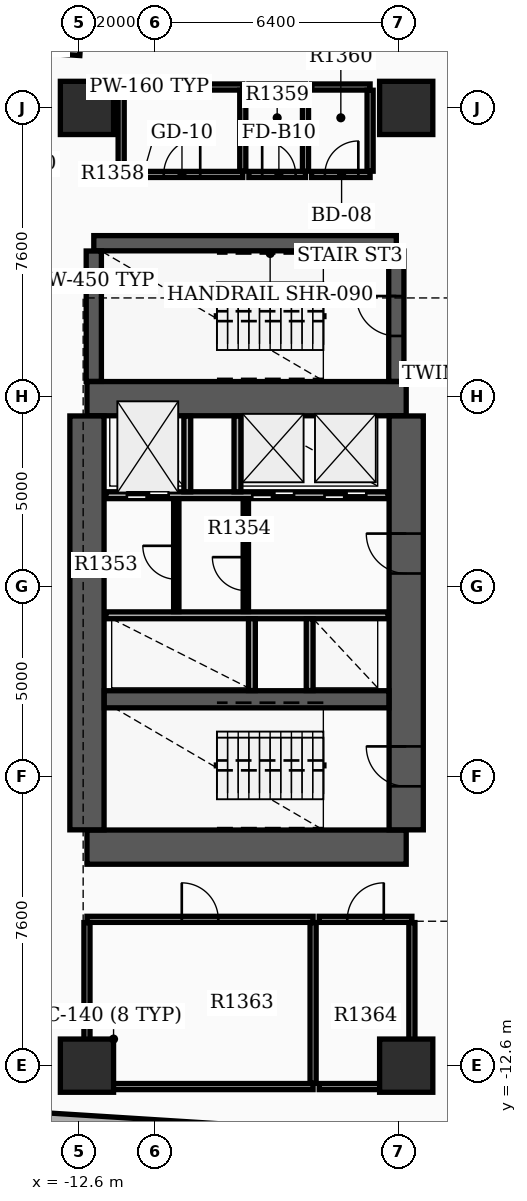
"""IFC4 building model, lengths in metres.
Left out: names, types, materials, properties, quantities, classifications, styles, units other than length and angle.
Written with IfcOpenShell. Run it as: python <this file> out.ifc"""

import sys

from ifc_helpers import new_model, si_unit, direction, frame, frame_2d, origin, origin_2d, place, context, subcontext, project, spatial, rectangle, extrude, element, fill, save


model = new_model("IFC4")
c1 = context("Model", 3, precision=1e-05, world=origin(), true_north=direction((0.0, 1.0)))
c2 = subcontext(c1, "Body", "Model", "MODEL_VIEW")
j1 = project(units=[si_unit("LENGTHUNIT", "METRE"), si_unit("PLANEANGLEUNIT", "RADIAN")], contexts=[c1])
p1 = place(None, origin())
s1 = spatial("IfcSite", under=j1, at=p1, CompositionType="ELEMENT")
p2 = place(p1, origin())
s2 = spatial("IfcBuilding", under=s1, at=p2, CompositionType="ELEMENT")
p3 = place(p2, frame((0.0, 0.0, 87.3)))
s3 = spatial("IfcBuildingStorey", under=s2, at=p3, CompositionType="ELEMENT", Elevation=87.3)
for number, where, z_axis, x_axis in (
    (1, (-12.4, -6.85, 0.0), (0.0, 0.0, 1.0), (1.0, 0.0, 0.0)),
    (2, (-12.4, 4.95, 0.0), (0.0, 0.0, 1.0), (1.0, 0.0, 0.0)),
):
    element("IfcWall", number, at=place(p3, frame(where, z_axis=z_axis, x_axis=x_axis)), inside=s3, PredefinedType="SHEAR", context=c2, shape_type="SweptSolid", body=[
        extrude(rectangle(XDim=8.4, YDim=0.9, at=frame_2d((4.2, 0.0))), origin(), (0.0, 0.0, 1.0), 3.7),
    ])
p4 = place(p3, frame((-12.4, -6.395, 0.0), z_axis=(0.0, 0.0, 1.0), x_axis=(0.0, 1.0, 0.0)))
e3 = element("IfcWall", 3, at=p4, inside=s3, PredefinedType="SHEAR", context=c2, shape_type="SweptSolid", body=[
    extrude(rectangle(XDim=10.89, YDim=0.9, at=frame_2d((5.445, 0.0))), origin(), (0.0, 0.0, 1.0), 3.7),
])
p5 = place(p3, frame((-4.0, -6.395, 0.0), z_axis=(0.0, 0.0, 1.0), x_axis=(0.0, 1.0, 0.0)))
e4 = element("IfcWall", 4, at=p5, inside=s3, PredefinedType="SHEAR", context=c2, shape_type="SweptSolid", body=[
    extrude(rectangle(XDim=10.89, YDim=0.9, at=frame_2d((5.445, 0.0))), origin(), (0.0, 0.0, 1.0), 3.7),
])
p6 = place(p5, frame((1.145, 0.0, 0.0)))
e5 = element("IfcOpeningElement", 5, at=p6, cuts=e4, PredefinedType="OPENING", context=c2, shape_type="SweptSolid", body=[
    extrude(rectangle(XDim=1.05, YDim=2.15, at=frame_2d((0.525, 1.075))), frame((0.0, 0.46, 0.0), z_axis=(0.0, -1.0, 0.0), x_axis=(1.0, 0.0, 0.0)), (0.0, 0.0, 1.0), 0.92),
])
p7 = place(p5, frame((6.745, 0.0, 0.0)))
e6 = element("IfcOpeningElement", 6, at=p7, cuts=e4, PredefinedType="OPENING", context=c2, shape_type="SweptSolid", body=[
    extrude(rectangle(XDim=1.05, YDim=2.15, at=frame_2d((0.525, 1.075))), frame((0.0, 0.46, 0.0), z_axis=(0.0, -1.0, 0.0), x_axis=(1.0, 0.0, 0.0)), (0.0, 0.0, 1.0), 0.92),
])
p8 = place(p3, frame((-11.945, -2.96, 0.0), z_axis=(0.0, 0.0, 1.0), x_axis=(1.0, 0.0, 0.0)))
e7 = element("IfcWall", 7, at=p8, inside=s3, PredefinedType="SHEAR", context=c2, shape_type="SweptSolid", body=[
    extrude(rectangle(XDim=7.49, YDim=0.45, at=frame_2d((3.745, 0.0))), origin(), (0.0, 0.0, 1.0), 3.7),
])
p9 = place(p3, frame((-12.22, 9.04, 0.0), z_axis=(0.0, 0.0, 1.0), x_axis=(1.0, 0.0, 0.0)))
e8 = element("IfcWall", 8, at=p9, inside=s3, PredefinedType="SHEAR", context=c2, shape_type="SweptSolid", body=[
    extrude(rectangle(XDim=7.96, YDim=0.4, at=frame_2d((3.98, 0.0))), origin(), (0.0, 0.0, 1.0), 3.7),
])
p10 = place(p3, frame((-12.22, 5.405, 0.0), z_axis=(0.0, 0.0, 1.0), x_axis=(0.0, 1.0, 0.0)))
e9 = element("IfcWall", 9, at=p10, inside=s3, PredefinedType="SHEAR", context=c2, shape_type="SweptSolid", body=[
    extrude(rectangle(XDim=3.43, YDim=0.4, at=frame_2d((1.715, 0.0))), origin(), (0.0, 0.0, 1.0), 3.7),
])
p11 = place(p3, frame((-4.26, 5.405, 0.0), z_axis=(0.0, 0.0, 1.0), x_axis=(0.0, 1.0, 0.0)))
e10 = element("IfcWall", 10, at=p11, inside=s3, PredefinedType="SHEAR", context=c2, shape_type="SweptSolid", body=[
    extrude(rectangle(XDim=3.43, YDim=0.4, at=frame_2d((1.715, 0.0))), origin(), (0.0, 0.0, 1.0), 3.7),
])
p12 = place(p11, frame((1.195, 0.0, 0.0)))
e11 = element("IfcOpeningElement", 11, at=p12, cuts=e10, PredefinedType="OPENING", context=c2, shape_type="SweptSolid", body=[
    extrude(rectangle(XDim=1.05, YDim=2.15, at=frame_2d((0.525, 1.075))), frame((0.0, 0.21, 0.0), z_axis=(0.0, -1.0, 0.0), x_axis=(1.0, 0.0, 0.0)), (0.0, 0.0, 1.0), 0.42),
])
for number, where, z_axis, x_axis in (
    (12, (-12.4, -12.6, 0.0), (0.0, 0.0, 1.0), (1.0, 0.0, 0.0)),
    (13, (-12.4, 12.6, 0.0), (0.0, 0.0, 1.0), (1.0, 0.0, 0.0)),
    (14, (-4.0, -12.6, 0.0), (0.0, 0.0, 1.0), (1.0, 0.0, 0.0)),
    (15, (-4.0, 12.6, 0.0), (0.0, 0.0, 1.0), (1.0, 0.0, 0.0)),
):
    element("IfcColumn", number, at=place(p3, frame(where, z_axis=z_axis, x_axis=x_axis)), inside=s3, PredefinedType="COLUMN", context=c2, shape_type="SweptSolid", body=[
        extrude(rectangle(XDim=1.4, YDim=1.4, at=origin_2d()), origin(), (0.0, 0.0, 1.0), 3.9),
    ])
p13 = place(p3, frame((-13.796, 14.194, 0.0), z_axis=(0.0, 0.0, 1.0), x_axis=(0.998023660242, -0.06283926796, 0.0)))
e16 = element("IfcWall", 16, at=p13, inside=s3, PredefinedType="STANDARD", context=c2, shape_type="SweptSolid", body=[
    extrude(rectangle(XDim=1.22, YDim=0.28, at=frame_2d((0.61, 0.0))), origin(), (0.0, 0.0, 1.0), 2.91),
])
p14 = place(p3, frame((-14.063, -13.945, 0.0), z_axis=(0.0, 0.0, 1.0), x_axis=(0.998027314704, -0.062781200242, 0.0)))
e17 = element("IfcWall", 17, at=p14, inside=s3, PredefinedType="STANDARD", context=c2, shape_type="SweptSolid", body=[
    extrude(rectangle(XDim=6.3, YDim=0.28, at=frame_2d((3.15, 0.0))), origin(), (0.0, 0.0, 1.0), 2.91),
])
p15 = place(p3, frame((-11.9, 2.41, 0.0), z_axis=(0.0, 0.0, 1.0), x_axis=(1.0, 0.0, 0.0)))
e18 = element("IfcWall", 18, at=p15, inside=s3, PredefinedType="SOLIDWALL", context=c2, shape_type="SweptSolid", body=[
    extrude(rectangle(XDim=7.42, YDim=0.18, at=frame_2d((3.71, 0.0))), origin(), (0.0, 0.0, 1.0), 2.9),
])
p16 = place(p15, frame((0.55, 0.0, 0.0)))
e19 = element("IfcOpeningElement", 19, at=p16, cuts=e18, PredefinedType="OPENING", context=c2, shape_type="SweptSolid", body=[
    extrude(rectangle(XDim=1.1, YDim=2.15, at=frame_2d((0.55, 1.075))), frame((0.0, 0.1, 0.0), z_axis=(0.0, -1.0, 0.0), x_axis=(1.0, 0.0, 0.0)), (0.0, 0.0, 1.0), 0.2),
])
p17 = place(p15, frame((3.85, 0.0, 0.0)))
e20 = element("IfcOpeningElement", 20, at=p17, cuts=e18, PredefinedType="OPENING", context=c2, shape_type="SweptSolid", body=[
    extrude(rectangle(XDim=1.1, YDim=2.15, at=frame_2d((0.55, 1.075))), frame((0.0, 0.1, 0.0), z_axis=(0.0, -1.0, 0.0), x_axis=(1.0, 0.0, 0.0)), (0.0, 0.0, 1.0), 0.2),
])
p18 = place(p15, frame((5.75, 0.0, 0.0)))
e21 = element("IfcOpeningElement", 21, at=p18, cuts=e18, PredefinedType="OPENING", context=c2, shape_type="SweptSolid", body=[
    extrude(rectangle(XDim=1.1, YDim=2.15, at=frame_2d((0.55, 1.075))), frame((0.0, 0.1, 0.0), z_axis=(0.0, -1.0, 0.0), x_axis=(1.0, 0.0, 0.0)), (0.0, 0.0, 1.0), 0.2),
])
p19 = place(p3, frame((-11.9, -0.75, 0.0), z_axis=(0.0, 0.0, 1.0), x_axis=(1.0, 0.0, 0.0)))
e22 = element("IfcWall", 22, at=p19, inside=s3, PredefinedType="SOLIDWALL", context=c2, shape_type="SweptSolid", body=[
    extrude(rectangle(XDim=7.42, YDim=0.18, at=frame_2d((3.71, 0.0))), origin(), (0.0, 0.0, 1.0), 2.9),
])
for number, where, z_axis, x_axis in (
    (23, (-9.76, 2.5, 0.0), (0.0, 0.0, 1.0), (0.0, 1.0, 0.0)),
    (24, (-8.44, 2.5, 0.0), (0.0, 0.0, 1.0), (0.0, 1.0, 0.0)),
):
    element("IfcWall", number, at=place(p3, frame(where, z_axis=z_axis, x_axis=x_axis)), inside=s3, PredefinedType="SOLIDWALL", context=c2, shape_type="SweptSolid", body=[
        extrude(rectangle(XDim=1.99, YDim=0.18, at=frame_2d((0.995, 0.0))), origin(), (0.0, 0.0, 1.0), 2.9),
    ])
for number, where, z_axis, x_axis in (
    (25, (-8.06, -2.73, 0.0), (0.0, 0.0, 1.0), (0.0, 1.0, 0.0)),
    (26, (-6.54, -2.73, 0.0), (0.0, 0.0, 1.0), (0.0, 1.0, 0.0)),
):
    element("IfcWall", number, at=place(p3, frame(where, z_axis=z_axis, x_axis=x_axis)), inside=s3, PredefinedType="SOLIDWALL", context=c2, shape_type="SweptSolid", body=[
        extrude(rectangle(XDim=1.89, YDim=0.18, at=frame_2d((0.945, 0.0))), origin(), (0.0, 0.0, 1.0), 2.9),
    ])
p20 = place(p3, frame((-8.22, -0.65, 0.0), z_axis=(0.0, 0.0, 1.0), x_axis=(0.0, 1.0, 0.0)))
e27 = element("IfcWall", 27, at=p20, inside=s3, PredefinedType="SOLIDWALL", context=c2, shape_type="SweptSolid", body=[
    extrude(rectangle(XDim=2.96, YDim=0.14, at=frame_2d((1.48, 0.0))), origin(), (0.0, 0.0, 1.0), 2.9),
])
p21 = place(p20, frame((0.55, 0.0, 0.0)))
e28 = element("IfcOpeningElement", 28, at=p21, cuts=e27, PredefinedType="OPENING", context=c2, shape_type="SweptSolid", body=[
    extrude(rectangle(XDim=0.88, YDim=2.1, at=frame_2d((0.44, 1.05))), frame((0.0, 0.08, 0.0), z_axis=(0.0, -1.0, 0.0), x_axis=(1.0, 0.0, 0.0)), (0.0, 0.0, 1.0), 0.16),
])
p22 = place(p3, frame((-10.05, -0.652, 0.0), z_axis=(0.0, 0.0, 1.0), x_axis=(0.0, 1.0, 0.0)))
e29 = element("IfcWall", 29, at=p22, inside=s3, PredefinedType="PARTITIONING", context=c2, shape_type="SweptSolid", body=[
    extrude(rectangle(XDim=2.962, YDim=0.14, at=frame_2d((1.481, 0.0))), origin(), (0.0, 0.0, 1.0), 2.9),
])
p23 = place(p22, frame((0.85, 0.0, 0.0)))
e30 = element("IfcOpeningElement", 30, at=p23, cuts=e29, PredefinedType="OPENING", context=c2, shape_type="SweptSolid", body=[
    extrude(rectangle(XDim=0.88, YDim=2.1, at=frame_2d((0.44, 1.05))), frame((0.0, 0.08, 0.0), z_axis=(0.0, -1.0, 0.0), x_axis=(1.0, 0.0, 0.0)), (0.0, 0.0, 1.0), 0.16),
])
p24 = place(p3, frame((-11.5, 10.85, 0.0), z_axis=(0.0, 0.0, 1.0), x_axis=(1.0, 0.0, 0.0)))
e31 = element("IfcWall", 31, at=p24, inside=s3, PredefinedType="PARTITIONING", context=c2, shape_type="SweptSolid", body=[
    extrude(rectangle(XDim=3.2, YDim=0.16, at=frame_2d((1.6, 0.0))), origin(), (0.0, 0.0, 1.0), 2.9),
])
p25 = place(p24, frame((1.12, 0.0, 0.0)))
e32 = element("IfcOpeningElement", 32, at=p25, cuts=e31, PredefinedType="OPENING", context=c2, shape_type="SweptSolid", body=[
    extrude(rectangle(XDim=0.96, YDim=2.15, at=frame_2d((0.48, 1.075))), frame((0.0, 0.09, 0.0), z_axis=(0.0, -1.0, 0.0), x_axis=(1.0, 0.0, 0.0)), (0.0, 0.0, 1.0), 0.18),
])
p26 = place(p3, frame((-11.5, 13.15, 0.0), z_axis=(0.0, 0.0, 1.0), x_axis=(1.0, 0.0, 0.0)))
e33 = element("IfcWall", 33, at=p26, inside=s3, PredefinedType="PARTITIONING", context=c2, shape_type="SweptSolid", body=[
    extrude(rectangle(XDim=3.2, YDim=0.16, at=frame_2d((1.6, 0.0))), origin(), (0.0, 0.0, 1.0), 2.9),
])
for number, where, z_axis, x_axis in (
    (34, (-11.5, 10.935, 0.0), (0.0, 0.0, 1.0), (0.0, 1.0, 0.0)),
    (35, (-8.3, 10.935, 0.0), (0.0, 0.0, 1.0), (0.0, 1.0, 0.0)),
):
    element("IfcWall", number, at=place(p3, frame(where, z_axis=z_axis, x_axis=x_axis)), inside=s3, PredefinedType="PARTITIONING", context=c2, shape_type="SweptSolid", body=[
        extrude(rectangle(XDim=2.13, YDim=0.16, at=frame_2d((1.065, 0.0))), origin(), (0.0, 0.0, 1.0), 2.9),
    ])
p27 = place(p3, frame((-8.14, 10.85, 0.0), z_axis=(0.0, 0.0, 1.0), x_axis=(1.0, 0.0, 0.0)))
e36 = element("IfcWall", 36, at=p27, inside=s3, PredefinedType="PARTITIONING", context=c2, shape_type="SweptSolid", body=[
    extrude(rectangle(XDim=1.49, YDim=0.16, at=frame_2d((0.745, 0.0))), origin(), (0.0, 0.0, 1.0), 2.9),
])
p28 = place(p27, frame((0.35, 0.0, 0.0)))
e37 = element("IfcOpeningElement", 37, at=p28, cuts=e36, PredefinedType="OPENING", context=c2, shape_type="SweptSolid", body=[
    extrude(rectangle(XDim=0.88, YDim=2.1, at=frame_2d((0.44, 1.05))), frame((0.0, 0.09, 0.0), z_axis=(0.0, -1.0, 0.0), x_axis=(1.0, 0.0, 0.0)), (0.0, 0.0, 1.0), 0.18),
])
p29 = place(p3, frame((-8.14, 13.15, 0.0), z_axis=(0.0, 0.0, 1.0), x_axis=(1.0, 0.0, 0.0)))
e38 = element("IfcWall", 38, at=p29, inside=s3, PredefinedType="PARTITIONING", context=c2, shape_type="SweptSolid", body=[
    extrude(rectangle(XDim=1.49, YDim=0.16, at=frame_2d((0.745, 0.0))), origin(), (0.0, 0.0, 1.0), 2.9),
])
p30 = place(p3, frame((-6.65, 10.935, 0.0), z_axis=(0.0, 0.0, 1.0), x_axis=(0.0, 1.0, 0.0)))
e39 = element("IfcWall", 39, at=p30, inside=s3, PredefinedType="PARTITIONING", context=c2, shape_type="SweptSolid", body=[
    extrude(rectangle(XDim=2.13, YDim=0.16, at=frame_2d((1.065, 0.0))), origin(), (0.0, 0.0, 1.0), 2.9),
])
p31 = place(p3, frame((-6.49, 10.85, 0.0), z_axis=(0.0, 0.0, 1.0), x_axis=(1.0, 0.0, 0.0)))
e40 = element("IfcWall", 40, at=p31, inside=s3, PredefinedType="PARTITIONING", context=c2, shape_type="SweptSolid", body=[
    extrude(rectangle(XDim=1.54, YDim=0.16, at=frame_2d((0.77, 0.0))), origin(), (0.0, 0.0, 1.0), 2.9),
])
p32 = place(p31, frame((0.35, 0.0, 0.0)))
e41 = element("IfcOpeningElement", 41, at=p32, cuts=e40, PredefinedType="OPENING", context=c2, shape_type="SweptSolid", body=[
    extrude(rectangle(XDim=0.88, YDim=2.15, at=frame_2d((0.44, 1.075))), frame((0.0, 0.09, 0.0), z_axis=(0.0, -1.0, 0.0), x_axis=(1.0, 0.0, 0.0)), (0.0, 0.0, 1.0), 0.18),
])
p33 = place(p3, frame((-6.49, 13.15, 0.0), z_axis=(0.0, 0.0, 1.0), x_axis=(1.0, 0.0, 0.0)))
e42 = element("IfcWall", 42, at=p33, inside=s3, PredefinedType="PARTITIONING", context=c2, shape_type="SweptSolid", body=[
    extrude(rectangle(XDim=1.54, YDim=0.16, at=frame_2d((0.77, 0.0))), origin(), (0.0, 0.0, 1.0), 2.9),
])
p34 = place(p3, frame((-4.95, 10.935, 0.0), z_axis=(0.0, 0.0, 1.0), x_axis=(0.0, 1.0, 0.0)))
e43 = element("IfcWall", 43, at=p34, inside=s3, PredefinedType="PARTITIONING", context=c2, shape_type="SweptSolid", body=[
    extrude(rectangle(XDim=2.13, YDim=0.16, at=frame_2d((1.065, 0.0))), origin(), (0.0, 0.0, 1.0), 2.9),
])
p35 = place(p3, frame((-12.4, -13.15, 0.0), z_axis=(0.0, 0.0, 1.0), x_axis=(1.0, 0.0, 0.0)))
e44 = element("IfcWall", 44, at=p35, inside=s3, PredefinedType="PARTITIONING", context=c2, shape_type="SweptSolid", body=[
    extrude(rectangle(XDim=5.95, YDim=0.16, at=frame_2d((2.975, 0.0))), origin(), (0.0, 0.0, 1.0), 2.9),
])
p36 = place(p3, frame((-12.4, -8.75, 0.0), z_axis=(0.0, 0.0, 1.0), x_axis=(1.0, 0.0, 0.0)))
e45 = element("IfcWall", 45, at=p36, inside=s3, PredefinedType="PARTITIONING", context=c2, shape_type="SweptSolid", body=[
    extrude(rectangle(XDim=5.95, YDim=0.16, at=frame_2d((2.975, 0.0))), origin(), (0.0, 0.0, 1.0), 2.9),
])
p37 = place(p36, frame((2.495, 0.0, 0.0)))
e46 = element("IfcOpeningElement", 46, at=p37, cuts=e45, PredefinedType="OPENING", context=c2, shape_type="SweptSolid", body=[
    extrude(rectangle(XDim=0.96, YDim=2.15, at=frame_2d((0.48, 1.075))), frame((0.0, 0.09, 0.0), z_axis=(0.0, -1.0, 0.0), x_axis=(1.0, 0.0, 0.0)), (0.0, 0.0, 1.0), 0.18),
])
for number, where, z_axis, x_axis in (
    (47, (-12.4, -13.065, 0.0), (0.0, 0.0, 1.0), (0.0, 1.0, 0.0)),
    (48, (-6.45, -13.065, 0.0), (0.0, 0.0, 1.0), (0.0, 1.0, 0.0)),
):
    element("IfcWall", number, at=place(p3, frame(where, z_axis=z_axis, x_axis=x_axis)), inside=s3, PredefinedType="PARTITIONING", context=c2, shape_type="SweptSolid", body=[
        extrude(rectangle(XDim=4.23, YDim=0.16, at=frame_2d((2.115, 0.0))), origin(), (0.0, 0.0, 1.0), 2.9),
    ])
p38 = place(p3, frame((-6.29, -13.15, 0.0), z_axis=(0.0, 0.0, 1.0), x_axis=(1.0, 0.0, 0.0)))
e49 = element("IfcWall", 49, at=p38, inside=s3, PredefinedType="PARTITIONING", context=c2, shape_type="SweptSolid", body=[
    extrude(rectangle(XDim=2.44, YDim=0.16, at=frame_2d((1.22, 0.0))), origin(), (0.0, 0.0, 1.0), 2.9),
])
p39 = place(p3, frame((-6.29, -8.75, 0.0), z_axis=(0.0, 0.0, 1.0), x_axis=(1.0, 0.0, 0.0)))
e50 = element("IfcWall", 50, at=p39, inside=s3, PredefinedType="PARTITIONING", context=c2, shape_type="SweptSolid", body=[
    extrude(rectangle(XDim=2.44, YDim=0.16, at=frame_2d((1.22, 0.0))), origin(), (0.0, 0.0, 1.0), 2.9),
])
p40 = place(p39, frame((0.74, 0.0, 0.0)))
e51 = element("IfcOpeningElement", 51, at=p40, cuts=e50, PredefinedType="OPENING", context=c2, shape_type="SweptSolid", body=[
    extrude(rectangle(XDim=0.96, YDim=2.15, at=frame_2d((0.48, 1.075))), frame((0.0, 0.09, 0.0), z_axis=(0.0, -1.0, 0.0), x_axis=(1.0, 0.0, 0.0)), (0.0, 0.0, 1.0), 0.18),
])
p41 = place(p3, frame((-3.85, -13.065, 0.0), z_axis=(0.0, 0.0, 1.0), x_axis=(0.0, 1.0, 0.0)))
e52 = element("IfcWall", 52, at=p41, inside=s3, PredefinedType="PARTITIONING", context=c2, shape_type="SweptSolid", body=[
    extrude(rectangle(XDim=4.23, YDim=0.16, at=frame_2d((2.115, 0.0))), origin(), (0.0, 0.0, 1.0), 2.9),
])
p42 = place(p6, origin())
e53 = element("IfcDoor", 53, at=p42, inside=s3, OperationType="SINGLE_SWING_RIGHT", PredefinedType="DOOR", context=c2, shape_type="SweptSolid", body=[
    extrude(rectangle(XDim=1.05, YDim=2.15, at=frame_2d((0.525, 1.075))), frame((0.0, 0.025, 0.0), z_axis=(0.0, -1.0, 0.0), x_axis=(1.0, 0.0, 0.0)), (0.0, 0.0, 1.0), 0.05),
])
fill(e5, e53)
p43 = place(p7, origin())
e54 = element("IfcDoor", 54, at=p43, inside=s3, OperationType="SINGLE_SWING_RIGHT", PredefinedType="DOOR", context=c2, shape_type="SweptSolid", body=[
    extrude(rectangle(XDim=1.05, YDim=2.15, at=frame_2d((0.525, 1.075))), frame((0.0, 0.025, 0.0), z_axis=(0.0, -1.0, 0.0), x_axis=(1.0, 0.0, 0.0)), (0.0, 0.0, 1.0), 0.05),
])
fill(e6, e54)
p44 = place(p12, origin())
e55 = element("IfcDoor", 55, at=p44, inside=s3, OperationType="SINGLE_SWING_RIGHT", PredefinedType="DOOR", context=c2, shape_type="SweptSolid", body=[
    extrude(rectangle(XDim=1.05, YDim=2.15, at=frame_2d((0.525, 1.075))), frame((0.0, 0.025, 0.0), z_axis=(0.0, -1.0, 0.0), x_axis=(1.0, 0.0, 0.0)), (0.0, 0.0, 1.0), 0.05),
])
fill(e11, e55)
p45 = place(p16, origin())
e56 = element("IfcDoor", 56, at=p45, inside=s3, OperationType="DOUBLE_DOOR_SLIDING", PredefinedType="DOOR", context=c2, shape_type="SweptSolid", body=[
    extrude(rectangle(XDim=1.1, YDim=2.15, at=frame_2d((0.55, 1.075))), frame((0.0, 0.025, 0.0), z_axis=(0.0, -1.0, 0.0), x_axis=(1.0, 0.0, 0.0)), (0.0, 0.0, 1.0), 0.05),
])
fill(e19, e56)
p46 = place(p17, origin())
e57 = element("IfcDoor", 57, at=p46, inside=s3, OperationType="DOUBLE_DOOR_SLIDING", PredefinedType="DOOR", context=c2, shape_type="SweptSolid", body=[
    extrude(rectangle(XDim=1.1, YDim=2.15, at=frame_2d((0.55, 1.075))), frame((0.0, 0.025, 0.0), z_axis=(0.0, -1.0, 0.0), x_axis=(1.0, 0.0, 0.0)), (0.0, 0.0, 1.0), 0.05),
])
fill(e20, e57)
p47 = place(p18, origin())
e58 = element("IfcDoor", 58, at=p47, inside=s3, OperationType="DOUBLE_DOOR_SLIDING", PredefinedType="DOOR", context=c2, shape_type="SweptSolid", body=[
    extrude(rectangle(XDim=1.1, YDim=2.15, at=frame_2d((0.55, 1.075))), frame((0.0, 0.025, 0.0), z_axis=(0.0, -1.0, 0.0), x_axis=(1.0, 0.0, 0.0)), (0.0, 0.0, 1.0), 0.05),
])
fill(e21, e58)
p48 = place(p21, origin())
e59 = element("IfcDoor", 59, at=p48, inside=s3, OperationType="SINGLE_SWING_RIGHT", PredefinedType="DOOR", context=c2, shape_type="SweptSolid", body=[
    extrude(rectangle(XDim=0.88, YDim=2.1, at=frame_2d((0.44, 1.05))), frame((0.0, 0.025, 0.0), z_axis=(0.0, -1.0, 0.0), x_axis=(1.0, 0.0, 0.0)), (0.0, 0.0, 1.0), 0.05),
])
fill(e28, e59)
p49 = place(p23, origin())
e60 = element("IfcDoor", 60, at=p49, inside=s3, OperationType="SINGLE_SWING_RIGHT", PredefinedType="DOOR", context=c2, shape_type="SweptSolid", body=[
    extrude(rectangle(XDim=0.88, YDim=2.1, at=frame_2d((0.44, 1.05))), frame((0.0, 0.025, 0.0), z_axis=(0.0, -1.0, 0.0), x_axis=(1.0, 0.0, 0.0)), (0.0, 0.0, 1.0), 0.05),
])
fill(e30, e60)
p50 = place(p25, origin())
e61 = element("IfcDoor", 61, at=p50, inside=s3, OperationType="SINGLE_SWING_RIGHT", PredefinedType="DOOR", context=c2, shape_type="SweptSolid", body=[
    extrude(rectangle(XDim=0.96, YDim=2.15, at=frame_2d((0.48, 1.075))), frame((0.0, 0.025, 0.0), z_axis=(0.0, -1.0, 0.0), x_axis=(1.0, 0.0, 0.0)), (0.0, 0.0, 1.0), 0.05),
])
fill(e32, e61)
p51 = place(p28, origin())
e62 = element("IfcDoor", 62, at=p51, inside=s3, OperationType="SINGLE_SWING_LEFT", PredefinedType="DOOR", context=c2, shape_type="SweptSolid", body=[
    extrude(rectangle(XDim=0.88, YDim=2.1, at=frame_2d((0.44, 1.05))), frame((0.0, 0.025, 0.0), z_axis=(0.0, -1.0, 0.0), x_axis=(1.0, 0.0, 0.0)), (0.0, 0.0, 1.0), 0.05),
])
fill(e37, e62)
p52 = place(p32, origin())
e63 = element("IfcDoor", 63, at=p52, inside=s3, OperationType="SINGLE_SWING_RIGHT", PredefinedType="DOOR", context=c2, shape_type="SweptSolid", body=[
    extrude(rectangle(XDim=0.88, YDim=2.15, at=frame_2d((0.44, 1.075))), frame((0.0, 0.025, 0.0), z_axis=(0.0, -1.0, 0.0), x_axis=(1.0, 0.0, 0.0)), (0.0, 0.0, 1.0), 0.05),
])
fill(e41, e63)
p53 = place(p37, origin())
e64 = element("IfcDoor", 64, at=p53, inside=s3, OperationType="SINGLE_SWING_LEFT", PredefinedType="DOOR", context=c2, shape_type="SweptSolid", body=[
    extrude(rectangle(XDim=0.96, YDim=2.15, at=frame_2d((0.48, 1.075))), frame((0.0, 0.025, 0.0), z_axis=(0.0, -1.0, 0.0), x_axis=(1.0, 0.0, 0.0)), (0.0, 0.0, 1.0), 0.05),
])
fill(e46, e64)
p54 = place(p40, origin())
e65 = element("IfcDoor", 65, at=p54, inside=s3, OperationType="SINGLE_SWING_RIGHT", PredefinedType="DOOR", context=c2, shape_type="SweptSolid", body=[
    extrude(rectangle(XDim=0.96, YDim=2.15, at=frame_2d((0.48, 1.075))), frame((0.0, 0.025, 0.0), z_axis=(0.0, -1.0, 0.0), x_axis=(1.0, 0.0, 0.0)), (0.0, 0.0, 1.0), 0.05),
])
fill(e51, e65)
save(model, sys.argv[1])
